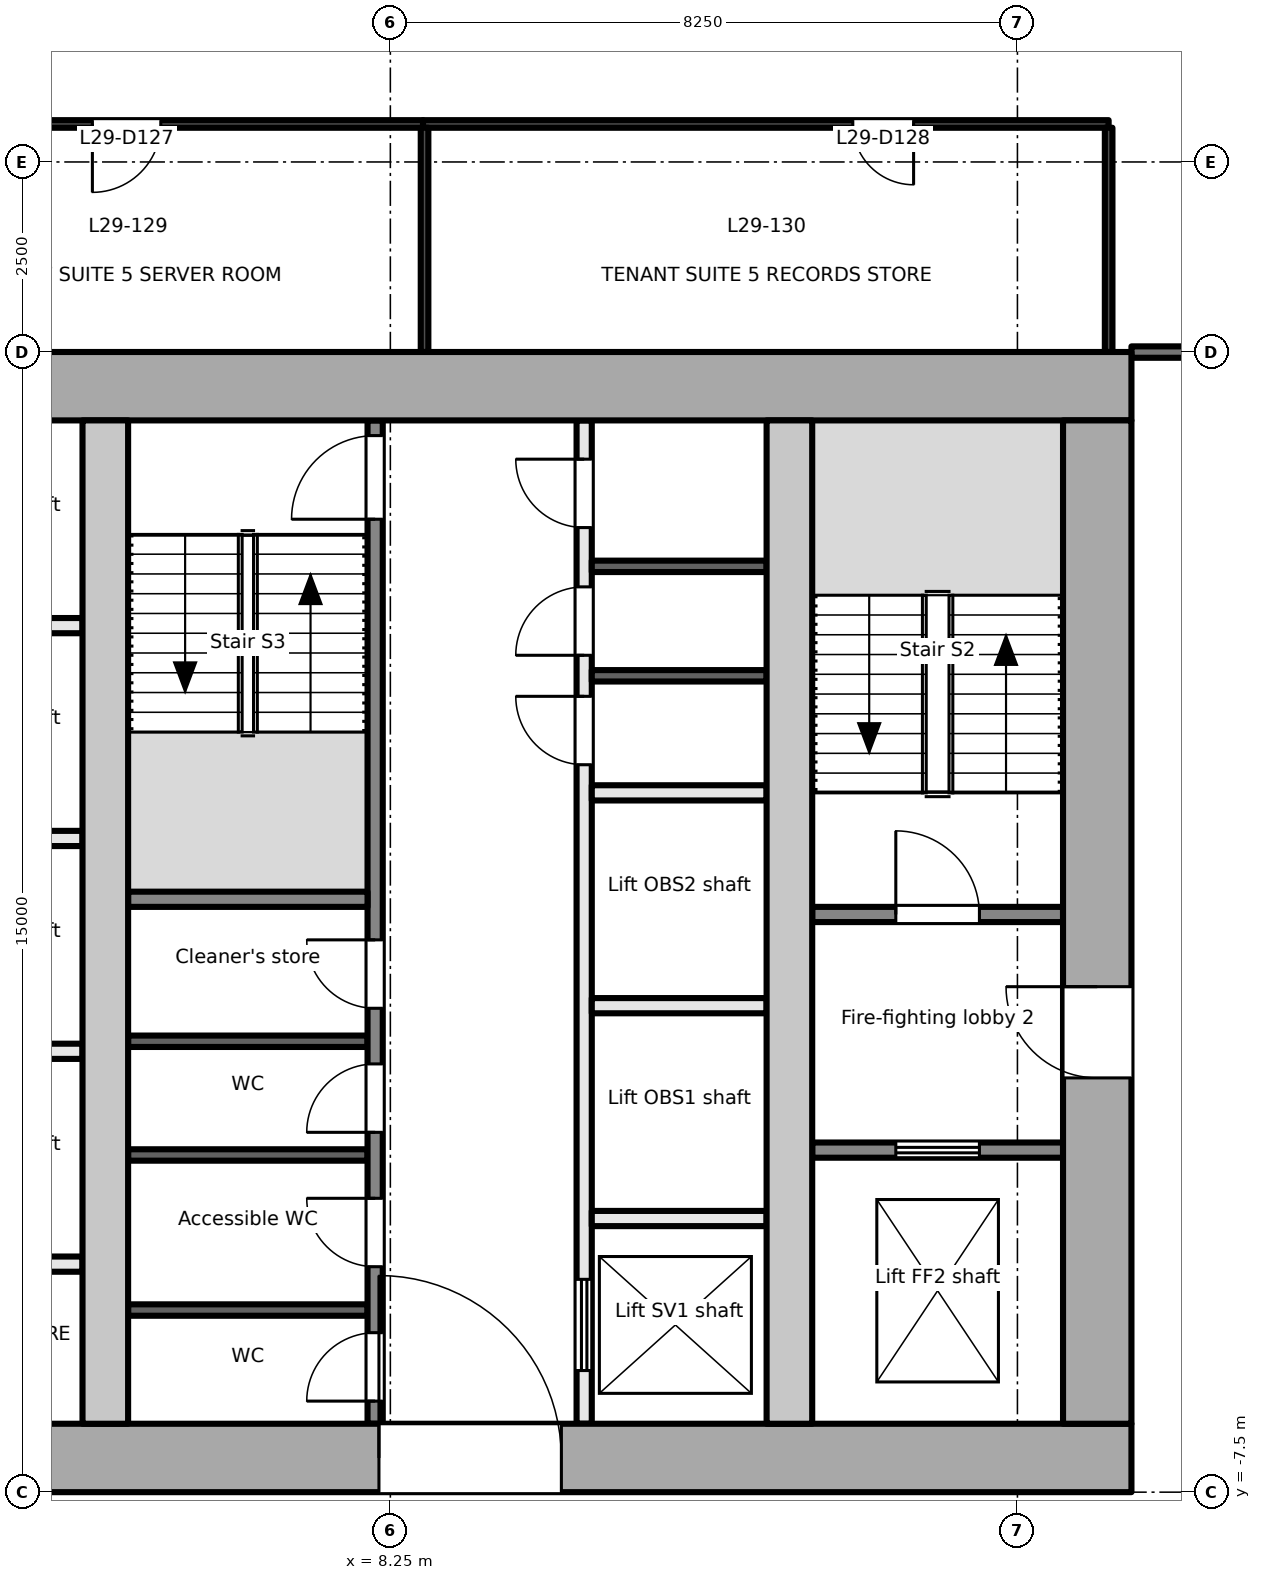
"""IFC4 building model, lengths in metres.
Left out: names, types, materials, properties, quantities, classifications, styles, units other than length and angle.
Written with IfcOpenShell. Run it as: python <this file> out.ifc"""

import sys

from ifc_helpers import new_model, si_unit, direction, frame, frame_2d, origin, place, context, subcontext, project, spatial, rectangle, extrude, element, fill, save


model = new_model("IFC4")
c1 = context("Model", 3, precision=1e-05, world=origin(), true_north=direction((0.0, 1.0)))
c2 = subcontext(c1, "Body", "Model", "MODEL_VIEW")
j1 = project(units=[si_unit("LENGTHUNIT", "METRE"), si_unit("PLANEANGLEUNIT", "RADIAN")], contexts=[c1])
p1 = place(None, origin())
s1 = spatial("IfcSite", under=j1, at=p1, CompositionType="ELEMENT")
p2 = place(p1, origin())
s2 = spatial("IfcBuilding", under=s1, at=p2, CompositionType="ELEMENT")
p3 = place(p2, frame((0.0, 0.0, 130.1)))
s3 = spatial("IfcBuildingStorey", under=s2, at=p3, CompositionType="ELEMENT", Elevation=130.1)
p4 = place(p3, frame((-18.0, -7.05, -0.2), z_axis=(0.0, 0.0, 1.0), x_axis=(1.0, 0.0, 0.0)))
e1 = element("IfcWall", 1, at=p4, inside=s3, PredefinedType="SHEAR", context=c2, shape_type="SweptSolid", body=[
    extrude(rectangle(XDim=36.0, YDim=0.9, at=frame_2d((18.0, 0.0))), origin(), (0.0, 0.0, 1.0), 4.0),
])
p5 = place(p4, frame((7.8, 0.0, 0.2)))
e2 = element("IfcOpeningElement", 2, at=p5, cuts=e1, PredefinedType="OPENING", context=c2, shape_type="SweptSolid", body=[
    extrude(rectangle(XDim=2.4, YDim=2.1, at=frame_2d((1.2, 1.05))), frame((0.0, 0.46, 0.0), z_axis=(0.0, -1.0, 0.0), x_axis=(1.0, 0.0, 0.0)), (0.0, 0.0, 1.0), 0.921),
])
p6 = place(p4, frame((17.4, 0.0, 0.2)))
e3 = element("IfcOpeningElement", 3, at=p6, cuts=e1, PredefinedType="OPENING", context=c2, shape_type="SweptSolid", body=[
    extrude(rectangle(XDim=1.2, YDim=2.1, at=frame_2d((0.6, 1.05))), frame((0.0, 0.46, 0.0), z_axis=(0.0, -1.0, 0.0), x_axis=(1.0, 0.0, 0.0)), (0.0, 0.0, 1.0), 0.921),
])
p7 = place(p4, frame((26.1, 0.0, 0.2)))
e4 = element("IfcOpeningElement", 4, at=p7, cuts=e1, PredefinedType="OPENING", context=c2, shape_type="SweptSolid", body=[
    extrude(rectangle(XDim=2.4, YDim=2.1, at=frame_2d((1.2, 1.05))), frame((0.0, 0.46, 0.0), z_axis=(0.0, -1.0, 0.0), x_axis=(1.0, 0.0, 0.0)), (0.0, 0.0, 1.0), 0.921),
])
p8 = place(p3, frame((-18.0, 7.05, -0.2), z_axis=(0.0, 0.0, 1.0), x_axis=(1.0, 0.0, 0.0)))
e5 = element("IfcWall", 5, at=p8, inside=s3, PredefinedType="SHEAR", context=c2, shape_type="SweptSolid", body=[
    extrude(rectangle(XDim=36.0, YDim=0.9, at=frame_2d((18.0, 0.0))), origin(), (0.0, 0.0, 1.0), 4.0),
])
p9 = place(p3, frame((17.55, -6.6, -0.2), z_axis=(0.0, 0.0, 1.0), x_axis=(0.0, 1.0, 0.0)))
e6 = element("IfcWall", 6, at=p9, inside=s3, PredefinedType="SHEAR", context=c2, shape_type="SweptSolid", body=[
    extrude(rectangle(XDim=13.2, YDim=0.9, at=frame_2d((6.6, 0.0))), origin(), (0.0, 0.0, 1.0), 4.0),
])
p10 = place(p9, frame((4.55, 0.0, 0.2)))
e7 = element("IfcOpeningElement", 7, at=p10, cuts=e6, PredefinedType="OPENING", context=c2, shape_type="SweptSolid", body=[
    extrude(rectangle(XDim=1.2, YDim=2.1, at=frame_2d((0.6, 1.05))), frame((0.0, 0.46, 0.0), z_axis=(0.0, -1.0, 0.0), x_axis=(1.0, 0.0, 0.0)), (0.0, 0.0, 1.0), 0.921),
])
for number, where, z_axis, x_axis in (
    (8, (4.5, -6.6, -0.2), (0.0, 0.0, 1.0), (0.0, 1.0, 0.0)),
    (9, (13.5, -6.6, -0.2), (0.0, 0.0, 1.0), (0.0, 1.0, 0.0)),
):
    element("IfcWall", number, at=place(p3, frame(where, z_axis=z_axis, x_axis=x_axis)), inside=s3, PredefinedType="SHEAR", context=c2, shape_type="SweptSolid", body=[
        extrude(rectangle(XDim=13.2, YDim=0.6, at=frame_2d((6.6, 0.0))), origin(), (0.0, 0.0, 1.0), 4.0),
    ])
p11 = place(p3, frame((13.8, -3.0, 0.0), z_axis=(0.0, 0.0, 1.0), x_axis=(1.0, 0.0, 0.0)))
e10 = element("IfcWall", 10, at=p11, inside=s3, PredefinedType="PARTITIONING", context=c2, shape_type="SweptSolid", body=[
    extrude(rectangle(XDim=3.3, YDim=0.2, at=frame_2d((1.65, 0.0))), origin(), (0.0, 0.0, 1.0), 3.8),
])
p12 = place(p11, frame((1.1, 0.0, 0.0)))
e11 = element("IfcOpeningElement", 11, at=p12, cuts=e10, PredefinedType="OPENING", context=c2, shape_type="SweptSolid", body=[
    extrude(rectangle(XDim=1.1, YDim=2.1, at=frame_2d((0.55, 1.05))), frame((0.0, 0.111, 0.0), z_axis=(0.0, -1.0, 0.0), x_axis=(1.0, 0.0, 0.0)), (0.0, 0.0, 1.0), 0.221),
])
p13 = place(p3, frame((13.8, 0.1, 0.0), z_axis=(0.0, 0.0, 1.0), x_axis=(1.0, 0.0, 0.0)))
e12 = element("IfcWall", 12, at=p13, inside=s3, PredefinedType="PARTITIONING", context=c2, shape_type="SweptSolid", body=[
    extrude(rectangle(XDim=3.3, YDim=0.2, at=frame_2d((1.65, 0.0))), origin(), (0.0, 0.0, 1.0), 3.8),
])
p14 = place(p13, frame((1.1, 0.0, 0.0)))
e13 = element("IfcOpeningElement", 13, at=p14, cuts=e12, PredefinedType="OPENING", context=c2, shape_type="SweptSolid", body=[
    extrude(rectangle(XDim=1.1, YDim=2.1, at=frame_2d((0.55, 1.05))), frame((0.0, 0.111, 0.0), z_axis=(0.0, -1.0, 0.0), x_axis=(1.0, 0.0, 0.0)), (0.0, 0.0, 1.0), 0.221),
])
for number, where, z_axis, x_axis in (
    (14, (1.9, -1.7, 0.0), (0.0, 0.0, 1.0), (1.0, 0.0, 0.0)),
    (15, (1.9, 1.1, 0.0), (0.0, 0.0, 1.0), (1.0, 0.0, 0.0)),
    (16, (1.9, 3.9, 0.0), (0.0, 0.0, 1.0), (1.0, 0.0, 0.0)),
    (17, (1.9, -4.5, 0.0), (0.0, 0.0, 1.0), (1.0, 0.0, 0.0)),
):
    element("IfcWall", number, at=place(p3, frame(where, z_axis=z_axis, x_axis=x_axis)), inside=s3, PredefinedType="PARTITIONING", context=c2, shape_type="SweptSolid", body=[
        extrude(rectangle(XDim=2.3, YDim=0.2, at=frame_2d((1.15, 0.0))), origin(), (0.0, 0.0, 1.0), 3.8),
    ])
p15 = place(p3, frame((8.05, -6.6, 0.0), z_axis=(0.0, 0.0, 1.0), x_axis=(0.0, 1.0, 0.0)))
e18 = element("IfcWall", 18, at=p15, inside=s3, PredefinedType="PARTITIONING", context=c2, shape_type="SweptSolid", body=[
    extrude(rectangle(XDim=13.2, YDim=0.2, at=frame_2d((6.6, 0.0))), origin(), (0.0, 0.0, 1.0), 3.8),
])
p16 = place(p15, frame((0.298, 0.0, 0.0)))
e19 = element("IfcOpeningElement", 19, at=p16, cuts=e18, PredefinedType="OPENING", context=c2, shape_type="SweptSolid", body=[
    extrude(rectangle(XDim=0.9, YDim=2.1, at=frame_2d((0.45, 1.05))), frame((0.0, 0.111, 0.0), z_axis=(0.0, -1.0, 0.0), x_axis=(1.0, 0.0, 0.0)), (0.0, 0.0, 1.0), 0.221),
])
p17 = place(p15, frame((2.066, 0.0, 0.0)))
e20 = element("IfcOpeningElement", 20, at=p17, cuts=e18, PredefinedType="OPENING", context=c2, shape_type="SweptSolid", body=[
    extrude(rectangle(XDim=0.9, YDim=2.1, at=frame_2d((0.45, 1.05))), frame((0.0, 0.111, 0.0), z_axis=(0.0, -1.0, 0.0), x_axis=(1.0, 0.0, 0.0)), (0.0, 0.0, 1.0), 0.221),
])
p18 = place(p15, frame((3.834, 0.0, 0.0)))
e21 = element("IfcOpeningElement", 21, at=p18, cuts=e18, PredefinedType="OPENING", context=c2, shape_type="SweptSolid", body=[
    extrude(rectangle(XDim=0.9, YDim=2.1, at=frame_2d((0.45, 1.05))), frame((0.0, 0.111, 0.0), z_axis=(0.0, -1.0, 0.0), x_axis=(1.0, 0.0, 0.0)), (0.0, 0.0, 1.0), 0.221),
])
p19 = place(p15, frame((5.466, 0.0, 0.0)))
e22 = element("IfcOpeningElement", 22, at=p19, cuts=e18, PredefinedType="OPENING", context=c2, shape_type="SweptSolid", body=[
    extrude(rectangle(XDim=0.9, YDim=2.1, at=frame_2d((0.45, 1.05))), frame((0.0, 0.111, 0.0), z_axis=(0.0, -1.0, 0.0), x_axis=(1.0, 0.0, 0.0)), (0.0, 0.0, 1.0), 0.221),
])
p20 = place(p15, frame((11.9, 0.0, 0.0)))
e23 = element("IfcOpeningElement", 23, at=p20, cuts=e18, PredefinedType="OPENING", context=c2, shape_type="SweptSolid", body=[
    extrude(rectangle(XDim=1.1, YDim=2.1, at=frame_2d((0.55, 1.05))), frame((0.0, 0.111, 0.0), z_axis=(0.0, -1.0, 0.0), x_axis=(1.0, 0.0, 0.0)), (0.0, 0.0, 1.0), 0.221),
])
p21 = place(p3, frame((10.8, -6.6, 0.0), z_axis=(0.0, 0.0, 1.0), x_axis=(0.0, 1.0, 0.0)))
e24 = element("IfcWall", 24, at=p21, inside=s3, PredefinedType="PARTITIONING", context=c2, shape_type="SweptSolid", body=[
    extrude(rectangle(XDim=13.2, YDim=0.2, at=frame_2d((6.6, 0.0))), origin(), (0.0, 0.0, 1.0), 3.8),
])
p22 = place(p21, frame((0.7, 0.0, 0.0)))
e25 = element("IfcOpeningElement", 25, at=p22, cuts=e24, PredefinedType="OPENING", context=c2, shape_type="SweptSolid", body=[
    extrude(rectangle(XDim=1.2, YDim=2.1, at=frame_2d((0.6, 1.05))), frame((0.0, 0.111, 0.0), z_axis=(0.0, -1.0, 0.0), x_axis=(1.0, 0.0, 0.0)), (0.0, 0.0, 1.0), 0.221),
])
p23 = place(p21, frame((8.67, 0.0, 0.0)))
e26 = element("IfcOpeningElement", 26, at=p23, cuts=e24, PredefinedType="OPENING", context=c2, shape_type="SweptSolid", body=[
    extrude(rectangle(XDim=0.9, YDim=2.1, at=frame_2d((0.45, 1.05))), frame((0.0, 0.111, 0.0), z_axis=(0.0, -1.0, 0.0), x_axis=(1.0, 0.0, 0.0)), (0.0, 0.0, 1.0), 0.221),
])
p24 = place(p21, frame((10.11, 0.0, 0.0)))
e27 = element("IfcOpeningElement", 27, at=p24, cuts=e24, PredefinedType="OPENING", context=c2, shape_type="SweptSolid", body=[
    extrude(rectangle(XDim=0.9, YDim=2.1, at=frame_2d((0.45, 1.05))), frame((0.0, 0.111, 0.0), z_axis=(0.0, -1.0, 0.0), x_axis=(1.0, 0.0, 0.0)), (0.0, 0.0, 1.0), 0.221),
])
p25 = place(p21, frame((11.79, 0.0, 0.0)))
e28 = element("IfcOpeningElement", 28, at=p25, cuts=e24, PredefinedType="OPENING", context=c2, shape_type="SweptSolid", body=[
    extrude(rectangle(XDim=0.9, YDim=2.1, at=frame_2d((0.45, 1.05))), frame((0.0, 0.111, 0.0), z_axis=(0.0, -1.0, 0.0), x_axis=(1.0, 0.0, 0.0)), (0.0, 0.0, 1.0), 0.221),
])
p26 = place(p3, frame((4.8, 0.3, 0.0), z_axis=(0.0, 0.0, 1.0), x_axis=(1.0, 0.0, 0.0)))
e29 = element("IfcWall", 29, at=p26, inside=s3, PredefinedType="PARTITIONING", context=c2, shape_type="SweptSolid", body=[
    extrude(rectangle(XDim=3.15, YDim=0.2, at=frame_2d((1.575, 0.0))), origin(), (0.0, 0.0, 1.0), 3.8),
])
for number, where, z_axis, x_axis in (
    (30, (4.8, -5.104, 0.0), (0.0, 0.0, 1.0), (1.0, 0.0, 0.0)),
    (31, (4.8, -3.064, 0.0), (0.0, 0.0, 1.0), (1.0, 0.0, 0.0)),
    (32, (4.8, -1.568, 0.0), (0.0, 0.0, 1.0), (1.0, 0.0, 0.0)),
):
    element("IfcWall", number, at=place(p3, frame(where, z_axis=z_axis, x_axis=x_axis)), inside=s3, PredefinedType="PARTITIONING", context=c2, shape_type="SweptSolid", body=[
        extrude(rectangle(XDim=3.15, YDim=0.15, at=frame_2d((1.575, 0.0))), origin(), (0.0, 0.0, 1.0), 3.8),
    ])
for number, where, z_axis, x_axis in (
    (33, (10.9, -3.9, 0.0), (0.0, 0.0, 1.0), (1.0, 0.0, 0.0)),
    (34, (10.9, -1.1, 0.0), (0.0, 0.0, 1.0), (1.0, 0.0, 0.0)),
    (35, (10.9, 1.7, 0.0), (0.0, 0.0, 1.0), (1.0, 0.0, 0.0)),
):
    element("IfcWall", number, at=place(p3, frame(where, z_axis=z_axis, x_axis=x_axis)), inside=s3, PredefinedType="PARTITIONING", context=c2, shape_type="SweptSolid", body=[
        extrude(rectangle(XDim=2.3, YDim=0.2, at=frame_2d((1.15, 0.0))), origin(), (0.0, 0.0, 1.0), 3.8),
    ])
for number, where, z_axis, x_axis in (
    (36, (10.9, 3.24, 0.0), (0.0, 0.0, 1.0), (1.0, 0.0, 0.0)),
    (37, (10.9, 4.68, 0.0), (0.0, 0.0, 1.0), (1.0, 0.0, 0.0)),
):
    element("IfcWall", number, at=place(p3, frame(where, z_axis=z_axis, x_axis=x_axis)), inside=s3, PredefinedType="PARTITIONING", context=c2, shape_type="SweptSolid", body=[
        extrude(rectangle(XDim=2.3, YDim=0.15, at=frame_2d((1.15, 0.0))), origin(), (0.0, 0.0, 1.0), 3.8),
    ])
p27 = place(p3, frame((18.0, 7.499, 0.0), z_axis=(0.0, 0.0, 1.0), x_axis=(1.0, 0.0, 0.0)))
e38 = element("IfcWall", 38, at=p27, inside=s3, PredefinedType="PARTITIONING", context=c2, shape_type="SweptSolid", body=[
    extrude(rectangle(XDim=2.61, YDim=0.15, at=frame_2d((1.305, 0.0))), origin(), (0.0, 0.0, 1.0), 3.8),
])
p28 = place(p3, frame((8.68, 10.5, 0.0), z_axis=(0.0, 0.0, 1.0), x_axis=(-1.0, 0.0, 0.0)))
e39 = element("IfcWall", 39, at=p28, inside=s3, PredefinedType="PARTITIONING", context=c2, shape_type="SweptSolid", body=[
    extrude(rectangle(XDim=7.8, YDim=0.1, at=frame_2d((3.9, 0.0))), origin(), (0.0, 0.0, 1.0), 3.5),
])
p29 = place(p28, frame((3.45, 0.0, 0.0)))
e40 = element("IfcOpeningElement", 40, at=p29, cuts=e39, PredefinedType="OPENING", context=c2, shape_type="SweptSolid", body=[
    extrude(rectangle(XDim=0.9, YDim=2.1, at=frame_2d((0.45, 1.05))), frame((0.0, 0.061, 0.0), z_axis=(0.0, -1.0, 0.0), x_axis=(1.0, 0.0, 0.0)), (0.0, 0.0, 1.0), 0.121),
])
p30 = place(p3, frame((17.7, 10.5, 0.0), z_axis=(0.0, 0.0, 1.0), x_axis=(-1.0, 0.0, 0.0)))
e41 = element("IfcWall", 41, at=p30, inside=s3, PredefinedType="PARTITIONING", context=c2, shape_type="SweptSolid", body=[
    extrude(rectangle(XDim=9.02, YDim=0.1, at=frame_2d((4.51, 0.0))), origin(), (0.0, 0.0, 1.0), 3.5),
])
p31 = place(p30, frame((2.566, 0.0, 0.0)))
e42 = element("IfcOpeningElement", 42, at=p31, cuts=e41, PredefinedType="OPENING", context=c2, shape_type="SweptSolid", body=[
    extrude(rectangle(XDim=0.8, YDim=2.1, at=frame_2d((0.4, 1.05))), frame((0.0, 0.061, 0.0), z_axis=(0.0, -1.0, 0.0), x_axis=(1.0, 0.0, 0.0)), (0.0, 0.0, 1.0), 0.121),
])
for number, where, z_axis, x_axis in (
    (43, (17.7, 7.5, 0.0), (0.0, 0.0, 1.0), (0.0, 1.0, 0.0)),
    (44, (8.7, 10.45, 0.0), (0.0, 0.0, 1.0), (0.0, -1.0, 0.0)),
):
    element("IfcWall", number, at=place(p3, frame(where, z_axis=z_axis, x_axis=x_axis)), inside=s3, PredefinedType="PARTITIONING", context=c2, shape_type="SweptSolid", body=[
        extrude(rectangle(XDim=2.95, YDim=0.1, at=frame_2d((1.475, 0.0))), origin(), (0.0, 0.0, 1.0), 3.8),
    ])
p32 = place(p12, origin())
e45 = element("IfcDoor", 45, at=p32, inside=s3, OperationType="DOUBLE_DOOR_SLIDING", PredefinedType="DOOR", context=c2, shape_type="SweptSolid", body=[
    extrude(rectangle(XDim=1.1, YDim=2.1, at=frame_2d((0.55, 1.05))), frame((0.0, 0.025, 0.0), z_axis=(0.0, -1.0, 0.0), x_axis=(1.0, 0.0, 0.0)), (0.0, 0.0, 1.0), 0.05),
])
fill(e11, e45)
p33 = place(p10, origin())
e46 = element("IfcDoor", 46, at=p33, inside=s3, OperationType="SINGLE_SWING_RIGHT", PredefinedType="DOOR", context=c2, shape_type="SweptSolid", body=[
    extrude(rectangle(XDim=1.2, YDim=2.1, at=frame_2d((0.6, 1.05))), frame((0.0, 0.025, 0.0), z_axis=(0.0, -1.0, 0.0), x_axis=(1.0, 0.0, 0.0)), (0.0, 0.0, 1.0), 0.05),
])
fill(e7, e46)
p34 = place(p14, origin())
e47 = element("IfcDoor", 47, at=p34, inside=s3, OperationType="SINGLE_SWING_LEFT", PredefinedType="DOOR", context=c2, shape_type="SweptSolid", body=[
    extrude(rectangle(XDim=1.1, YDim=2.1, at=frame_2d((0.55, 1.05))), frame((0.0, 0.025, 0.0), z_axis=(0.0, -1.0, 0.0), x_axis=(1.0, 0.0, 0.0)), (0.0, 0.0, 1.0), 0.05),
])
fill(e13, e47)
p35 = place(p16, origin())
e48 = element("IfcDoor", 48, at=p35, inside=s3, OperationType="SINGLE_SWING_LEFT", PredefinedType="DOOR", context=c2, shape_type="SweptSolid", body=[
    extrude(rectangle(XDim=0.9, YDim=2.1, at=frame_2d((0.45, 1.05))), frame((0.0, 0.025, 0.0), z_axis=(0.0, -1.0, 0.0), x_axis=(1.0, 0.0, 0.0)), (0.0, 0.0, 1.0), 0.05),
])
fill(e19, e48)
p36 = place(p17, origin())
e49 = element("IfcDoor", 49, at=p36, inside=s3, OperationType="SINGLE_SWING_RIGHT", PredefinedType="DOOR", context=c2, shape_type="SweptSolid", body=[
    extrude(rectangle(XDim=0.9, YDim=2.1, at=frame_2d((0.45, 1.05))), frame((0.0, 0.025, 0.0), z_axis=(0.0, -1.0, 0.0), x_axis=(1.0, 0.0, 0.0)), (0.0, 0.0, 1.0), 0.05),
])
fill(e20, e49)
p37 = place(p18, origin())
e50 = element("IfcDoor", 50, at=p37, inside=s3, OperationType="SINGLE_SWING_LEFT", PredefinedType="DOOR", context=c2, shape_type="SweptSolid", body=[
    extrude(rectangle(XDim=0.9, YDim=2.1, at=frame_2d((0.45, 1.05))), frame((0.0, 0.025, 0.0), z_axis=(0.0, -1.0, 0.0), x_axis=(1.0, 0.0, 0.0)), (0.0, 0.0, 1.0), 0.05),
])
fill(e21, e50)
p38 = place(p19, origin())
e51 = element("IfcDoor", 51, at=p38, inside=s3, OperationType="SINGLE_SWING_RIGHT", PredefinedType="DOOR", context=c2, shape_type="SweptSolid", body=[
    extrude(rectangle(XDim=0.9, YDim=2.1, at=frame_2d((0.45, 1.05))), frame((0.0, 0.025, 0.0), z_axis=(0.0, -1.0, 0.0), x_axis=(1.0, 0.0, 0.0)), (0.0, 0.0, 1.0), 0.05),
])
fill(e22, e51)
p39 = place(p20, origin())
e52 = element("IfcDoor", 52, at=p39, inside=s3, OperationType="SINGLE_SWING_LEFT", PredefinedType="DOOR", context=c2, shape_type="SweptSolid", body=[
    extrude(rectangle(XDim=1.1, YDim=2.1, at=frame_2d((0.55, 1.05))), frame((0.0, 0.025, 0.0), z_axis=(0.0, -1.0, 0.0), x_axis=(1.0, 0.0, 0.0)), (0.0, 0.0, 1.0), 0.05),
])
fill(e23, e52)
p40 = place(p7, origin())
e53 = element("IfcDoor", 53, at=p40, inside=s3, OperationType="DOUBLE_DOOR_DOUBLE_SWING", PredefinedType="DOOR", context=c2, shape_type="SweptSolid", body=[
    extrude(rectangle(XDim=2.4, YDim=2.1, at=frame_2d((1.2, 1.05))), frame((0.0, 0.025, 0.0), z_axis=(0.0, -1.0, 0.0), x_axis=(1.0, 0.0, 0.0)), (0.0, 0.0, 1.0), 0.05),
])
fill(e4, e53)
p41 = place(p22, origin())
e54 = element("IfcDoor", 54, at=p41, inside=s3, OperationType="DOUBLE_DOOR_SLIDING", PredefinedType="DOOR", context=c2, shape_type="SweptSolid", body=[
    extrude(rectangle(XDim=1.2, YDim=2.1, at=frame_2d((0.6, 1.05))), frame((0.0, 0.025, 0.0), z_axis=(0.0, -1.0, 0.0), x_axis=(1.0, 0.0, 0.0)), (0.0, 0.0, 1.0), 0.05),
])
fill(e25, e54)
p42 = place(p23, origin())
e55 = element("IfcDoor", 55, at=p42, inside=s3, OperationType="SINGLE_SWING_RIGHT", PredefinedType="DOOR", context=c2, shape_type="SweptSolid", body=[
    extrude(rectangle(XDim=0.9, YDim=2.1, at=frame_2d((0.45, 1.05))), frame((0.0, 0.025, 0.0), z_axis=(0.0, -1.0, 0.0), x_axis=(1.0, 0.0, 0.0)), (0.0, 0.0, 1.0), 0.05),
])
fill(e26, e55)
p43 = place(p24, origin())
e56 = element("IfcDoor", 56, at=p43, inside=s3, OperationType="SINGLE_SWING_LEFT", PredefinedType="DOOR", context=c2, shape_type="SweptSolid", body=[
    extrude(rectangle(XDim=0.9, YDim=2.1, at=frame_2d((0.45, 1.05))), frame((0.0, 0.025, 0.0), z_axis=(0.0, -1.0, 0.0), x_axis=(1.0, 0.0, 0.0)), (0.0, 0.0, 1.0), 0.05),
])
fill(e27, e56)
p44 = place(p25, origin())
e57 = element("IfcDoor", 57, at=p44, inside=s3, OperationType="SINGLE_SWING_RIGHT", PredefinedType="DOOR", context=c2, shape_type="SweptSolid", body=[
    extrude(rectangle(XDim=0.9, YDim=2.1, at=frame_2d((0.45, 1.05))), frame((0.0, 0.025, 0.0), z_axis=(0.0, -1.0, 0.0), x_axis=(1.0, 0.0, 0.0)), (0.0, 0.0, 1.0), 0.05),
])
fill(e28, e57)
p45 = place(p29, origin())
e58 = element("IfcDoor", 58, at=p45, inside=s3, OperationType="SINGLE_SWING_RIGHT", PredefinedType="DOOR", context=c2, shape_type="SweptSolid", body=[
    extrude(rectangle(XDim=0.9, YDim=2.1, at=frame_2d((0.45, 1.05))), frame((0.0, 0.025, 0.0), z_axis=(0.0, -1.0, 0.0), x_axis=(1.0, 0.0, 0.0)), (0.0, 0.0, 1.0), 0.05),
])
fill(e40, e58)
p46 = place(p31, origin())
e59 = element("IfcDoor", 59, at=p46, inside=s3, OperationType="SINGLE_SWING_LEFT", PredefinedType="DOOR", context=c2, shape_type="SweptSolid", body=[
    extrude(rectangle(XDim=0.8, YDim=2.1, at=frame_2d((0.4, 1.05))), frame((0.0, 0.025, 0.0), z_axis=(0.0, -1.0, 0.0), x_axis=(1.0, 0.0, 0.0)), (0.0, 0.0, 1.0), 0.05),
])
fill(e42, e59)
save(model, sys.argv[1])
